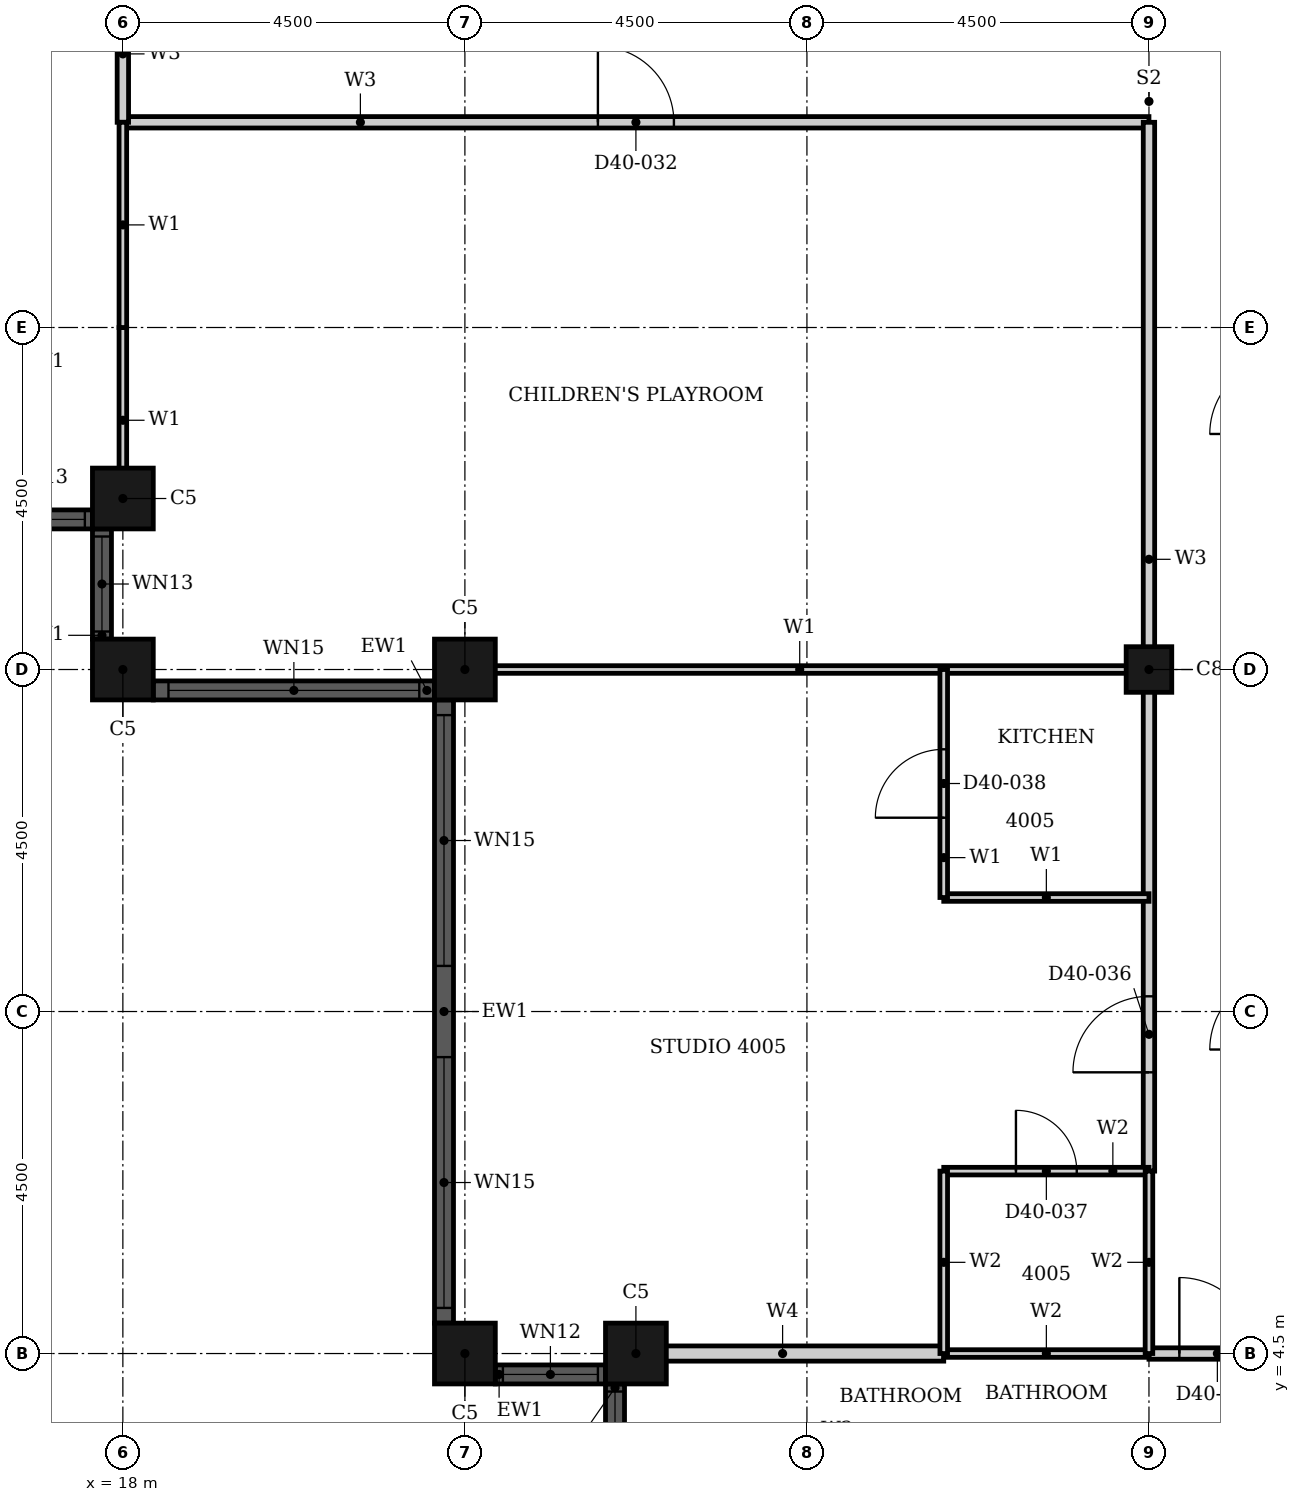
"""IFC4 building model, lengths in metres.
Left out: names, types, materials, properties, quantities, classifications, styles, units other than length and angle.
Written with IfcOpenShell. Run it as: python <this file> out.ifc"""

import sys

from ifc_helpers import new_model, si_unit, direction, frame, frame_2d, origin, origin_2d, place, context, subcontext, project, spatial, rectangle, hollow_rectangle, extrude, element, fill, save


model = new_model("IFC4")
c1 = context("Model", 3, precision=1e-05, world=origin(), true_north=direction((0.0, 1.0)))
c2 = subcontext(c1, "Body", "Model", "MODEL_VIEW")
j1 = project(units=[si_unit("LENGTHUNIT", "METRE"), si_unit("PLANEANGLEUNIT", "RADIAN")], contexts=[c1])
p1 = place(None, origin())
s1 = spatial("IfcSite", under=j1, at=p1, CompositionType="ELEMENT")
p2 = place(p1, origin())
s2 = spatial("IfcBuilding", under=s1, at=p2, CompositionType="ELEMENT")
p3 = place(p2, frame((0.0, 0.0, 161.7)))
s3 = spatial("IfcBuildingStorey", under=s2, at=p3, CompositionType="ELEMENT", Elevation=161.7)
for number, where, z_axis, x_axis in (
    (1, (22.5, 4.5, 0.0), (0.0, 0.0, 1.0), (1.0, 0.0, 0.0)),
    (2, (24.75, 4.5, 0.0), (0.0, 0.0, 1.0), (1.0, 0.0, 0.0)),
    (3, (18.0, 15.75, 0.0), (0.0, 0.0, 1.0), (1.0, 0.0, 0.0)),
    (4, (18.0, 13.5, 0.0), (0.0, 0.0, 1.0), (1.0, 0.0, 0.0)),
    (5, (22.5, 13.5, 0.0), (0.0, 0.0, 1.0), (1.0, 0.0, 0.0)),
):
    element("IfcColumn", number, at=place(p3, frame(where, z_axis=z_axis, x_axis=x_axis)), inside=s3, PredefinedType="COLUMN", context=c2, shape_type="SweptSolid", body=[
        extrude(hollow_rectangle(XDim=0.8, YDim=0.8, WallThickness=0.025, at=origin_2d()), origin(), (0.0, 0.0, 1.0), 3.7),
    ])
p4 = place(p3, frame((31.5, 13.5, 0.0), z_axis=(0.0, 0.0, 1.0), x_axis=(1.0, 0.0, 0.0)))
e6 = element("IfcColumn", 6, at=p4, inside=s3, PredefinedType="COLUMN", context=c2, shape_type="SweptSolid", body=[
    extrude(hollow_rectangle(XDim=0.6, YDim=0.6, WallThickness=0.02, at=origin_2d()), origin(), (0.0, 0.0, 1.0), 3.7),
])
p5 = place(p3, frame((22.9, 4.225, 0.0), z_axis=(0.0, 0.0, 1.0), x_axis=(1.0, 0.0, 0.0)))
e7 = element("IfcWall", 7, at=p5, inside=s3, PredefinedType="SOLIDWALL", context=c2, shape_type="SweptSolid", body=[
    extrude(rectangle(XDim=1.45, YDim=0.25, at=frame_2d((0.725, 0.0))), origin(), (0.0, 0.0, 1.0), 3.7),
])
p6 = place(p5, frame((0.1, 0.0, 0.9)))
e8 = element("IfcOpeningElement", 8, at=p6, cuts=e7, PredefinedType="OPENING", context=c2, shape_type="SweptSolid", body=[
    extrude(rectangle(XDim=1.25, YDim=2.08, at=frame_2d((0.625, 1.04))), frame((0.0, 0.135, 0.0), z_axis=(0.0, -1.0, 0.0), x_axis=(1.0, 0.0, 0.0)), (0.0, 0.0, 1.0), 0.27),
])
p7 = place(p3, frame((24.475, 4.1, 0.0), z_axis=(0.0, 0.0, 1.0), x_axis=(0.0, -1.0, 0.0)))
e9 = element("IfcWall", 9, at=p7, inside=s3, PredefinedType="SOLIDWALL", context=c2, shape_type="SweptSolid", body=[
    extrude(rectangle(XDim=1.45, YDim=0.25, at=frame_2d((0.725, 0.0))), origin(), (0.0, 0.0, 1.0), 3.7),
])
p8 = place(p7, frame((0.1, 0.0, 0.9)))
e10 = element("IfcOpeningElement", 10, at=p8, cuts=e9, PredefinedType="OPENING", context=c2, shape_type="SweptSolid", body=[
    extrude(rectangle(XDim=1.25, YDim=1.85, at=frame_2d((0.625, 0.925))), frame((0.0, 0.135, 0.0), z_axis=(0.0, -1.0, 0.0), x_axis=(1.0, 0.0, 0.0)), (0.0, 0.0, 1.0), 0.27),
])
p9 = place(p3, frame((16.15, 15.475, 0.0), z_axis=(0.0, 0.0, 1.0), x_axis=(1.0, 0.0, 0.0)))
e11 = element("IfcWall", 11, at=p9, inside=s3, PredefinedType="SOLIDWALL", context=c2, shape_type="SweptSolid", body=[
    extrude(rectangle(XDim=1.45, YDim=0.25, at=frame_2d((0.725, 0.0))), origin(), (0.0, 0.0, 1.0), 3.7),
])
p10 = place(p9, frame((0.1, 0.0, 0.9)))
e12 = element("IfcOpeningElement", 12, at=p10, cuts=e11, PredefinedType="OPENING", context=c2, shape_type="SweptSolid", body=[
    extrude(rectangle(XDim=1.25, YDim=1.85, at=frame_2d((0.625, 0.925))), frame((0.0, 0.135, 0.0), z_axis=(0.0, -1.0, 0.0), x_axis=(1.0, 0.0, 0.0)), (0.0, 0.0, 1.0), 0.27),
])
p11 = place(p3, frame((17.725, 15.35, 0.0), z_axis=(0.0, 0.0, 1.0), x_axis=(0.0, -1.0, 0.0)))
e13 = element("IfcWall", 13, at=p11, inside=s3, PredefinedType="SOLIDWALL", context=c2, shape_type="SweptSolid", body=[
    extrude(rectangle(XDim=1.45, YDim=0.25, at=frame_2d((0.725, 0.0))), origin(), (0.0, 0.0, 1.0), 3.7),
])
p12 = place(p11, frame((0.1, 0.0, 0.9)))
e14 = element("IfcOpeningElement", 14, at=p12, cuts=e13, PredefinedType="OPENING", context=c2, shape_type="SweptSolid", body=[
    extrude(rectangle(XDim=1.25, YDim=1.85, at=frame_2d((0.625, 0.925))), frame((0.0, 0.135, 0.0), z_axis=(0.0, -1.0, 0.0), x_axis=(1.0, 0.0, 0.0)), (0.0, 0.0, 1.0), 0.27),
])
p13 = place(p3, frame((18.4, 13.225, 0.0), z_axis=(0.0, 0.0, 1.0), x_axis=(1.0, 0.0, 0.0)))
e15 = element("IfcWall", 15, at=p13, inside=s3, PredefinedType="SOLIDWALL", context=c2, shape_type="SweptSolid", body=[
    extrude(rectangle(XDim=3.7, YDim=0.25, at=frame_2d((1.85, 0.0))), origin(), (0.0, 0.0, 1.0), 3.7),
])
p14 = place(p13, frame((0.2, 0.0, 0.45)))
e16 = element("IfcOpeningElement", 16, at=p14, cuts=e15, PredefinedType="OPENING", context=c2, shape_type="SweptSolid", body=[
    extrude(rectangle(XDim=3.3, YDim=2.3, at=frame_2d((1.65, 1.15))), frame((0.0, 0.135, 0.0), z_axis=(0.0, -1.0, 0.0), x_axis=(1.0, 0.0, 0.0)), (0.0, 0.0, 1.0), 0.27),
])
p15 = place(p3, frame((22.225, 13.1, 0.0), z_axis=(0.0, 0.0, 1.0), x_axis=(0.0, -1.0, 0.0)))
e17 = element("IfcWall", 17, at=p15, inside=s3, PredefinedType="SOLIDWALL", context=c2, shape_type="SweptSolid", body=[
    extrude(rectangle(XDim=8.2, YDim=0.25, at=frame_2d((4.1, 0.0))), origin(), (0.0, 0.0, 1.0), 3.7),
])
p16 = place(p15, frame((0.2, 0.0, 0.45)))
e18 = element("IfcOpeningElement", 18, at=p16, cuts=e17, PredefinedType="OPENING", context=c2, shape_type="SweptSolid", body=[
    extrude(rectangle(XDim=3.3, YDim=2.3, at=frame_2d((1.65, 1.15))), frame((0.0, 0.135, 0.0), z_axis=(0.0, -1.0, 0.0), x_axis=(1.0, 0.0, 0.0)), (0.0, 0.0, 1.0), 0.27),
])
p17 = place(p15, frame((4.7, 0.0, 0.45)))
e19 = element("IfcOpeningElement", 19, at=p17, cuts=e17, PredefinedType="OPENING", context=c2, shape_type="SweptSolid", body=[
    extrude(rectangle(XDim=3.3, YDim=2.3, at=frame_2d((1.65, 1.15))), frame((0.0, 0.135, 0.0), z_axis=(0.0, -1.0, 0.0), x_axis=(1.0, 0.0, 0.0)), (0.0, 0.0, 1.0), 0.27),
])
p18 = place(p3, frame((18.0, 20.7, 0.0), z_axis=(0.0, 0.0, 1.0), x_axis=(1.0, 0.0, 0.0)))
e20 = element("IfcWall", 20, at=p18, inside=s3, PredefinedType="PARTITIONING", context=c2, shape_type="SweptSolid", body=[
    extrude(rectangle(XDim=13.5, YDim=0.15, at=frame_2d((6.75, 0.0))), origin(), (0.0, 0.0, 1.0), 3.4),
])
p19 = place(p18, frame((6.25, 0.0, 0.0)))
e21 = element("IfcOpeningElement", 21, at=p19, cuts=e20, PredefinedType="OPENING", context=c2, shape_type="SweptSolid", body=[
    extrude(rectangle(XDim=1.0, YDim=2.1, at=frame_2d((0.5, 1.05))), frame((0.0, 0.085, 0.0), z_axis=(0.0, -1.0, 0.0), x_axis=(1.0, 0.0, 0.0)), (0.0, 0.0, 1.0), 0.17),
])
p20 = place(p3, frame((31.5, 4.5, 0.0), z_axis=(0.0, 0.0, 1.0), x_axis=(1.0, 0.0, 0.0)))
e22 = element("IfcWall", 22, at=p20, inside=s3, PredefinedType="PARTITIONING", context=c2, shape_type="SweptSolid", body=[
    extrude(rectangle(XDim=1.8, YDim=0.15, at=frame_2d((0.9, 0.0))), origin(), (0.0, 0.0, 1.0), 3.4),
])
p21 = place(p20, frame((0.4, 0.0, 0.0)))
e23 = element("IfcOpeningElement", 23, at=p21, cuts=e22, PredefinedType="OPENING", context=c2, shape_type="SweptSolid", body=[
    extrude(rectangle(XDim=1.0, YDim=2.2, at=frame_2d((0.5, 1.1))), frame((0.0, 0.085, 0.0), z_axis=(0.0, -1.0, 0.0), x_axis=(1.0, 0.0, 0.0)), (0.0, 0.0, 1.0), 0.17),
])
p22 = place(p3, frame((18.0, 20.7, 0.0), z_axis=(0.0, 0.0, 1.0), x_axis=(0.0, 1.0, 0.0)))
e24 = element("IfcWall", 24, at=p22, inside=s3, PredefinedType="PARTITIONING", context=c2, shape_type="SweptSolid", body=[
    extrude(rectangle(XDim=1.8, YDim=0.15, at=frame_2d((0.9, 0.0))), origin(), (0.0, 0.0, 1.0), 3.4),
])
p23 = place(p3, frame((31.5, 6.9, 0.0), z_axis=(0.0, 0.0, 1.0), x_axis=(0.0, 1.0, 0.0)))
e25 = element("IfcWall", 25, at=p23, inside=s3, PredefinedType="PARTITIONING", context=c2, shape_type="SweptSolid", body=[
    extrude(rectangle(XDim=13.8, YDim=0.15, at=frame_2d((6.9, 0.0))), origin(), (0.0, 0.0, 1.0), 2.68),
])
p24 = place(p23, frame((1.3, 0.0, 0.0)))
e26 = element("IfcOpeningElement", 26, at=p24, cuts=e25, PredefinedType="OPENING", context=c2, shape_type="SweptSolid", body=[
    extrude(rectangle(XDim=1.0, YDim=2.2, at=frame_2d((0.5, 1.1))), frame((0.0, 0.085, 0.0), z_axis=(0.0, -1.0, 0.0), x_axis=(1.0, 0.0, 0.0)), (0.0, 0.0, 1.0), 0.17),
])
p25 = place(p3, frame((28.8, 10.5, 0.0), z_axis=(0.0, 0.0, 1.0), x_axis=(1.0, 0.0, 0.0)))
e27 = element("IfcWall", 27, at=p25, inside=s3, PredefinedType="PARTITIONING", context=c2, shape_type="SweptSolid", body=[
    extrude(rectangle(XDim=2.7, YDim=0.1, at=frame_2d((1.35, 0.0))), origin(), (0.0, 0.0, 1.0), 3.4),
])
p26 = place(p3, frame((22.31, 13.5, 0.0), z_axis=(0.0, 0.0, 1.0), x_axis=(1.0, 0.0, 0.0)))
e28 = element("IfcWall", 28, at=p26, inside=s3, PredefinedType="PARTITIONING", context=c2, shape_type="SweptSolid", body=[
    extrude(rectangle(XDim=9.19, YDim=0.1, at=frame_2d((4.595, 0.0))), origin(), (0.0, 0.0, 1.0), 2.48),
])
p27 = place(p3, frame((18.0, 15.56, 0.0), z_axis=(0.0, 0.0, 1.0), x_axis=(0.0, 1.0, 0.0)))
e29 = element("IfcWall", 29, at=p27, inside=s3, PredefinedType="PARTITIONING", context=c2, shape_type="SweptSolid", body=[
    extrude(rectangle(XDim=2.439, YDim=0.1, at=frame_2d((1.219, 0.0))), origin(), (0.0, 0.0, 1.0), 3.4),
])
p28 = place(p3, frame((18.0, 18.0, 0.0), z_axis=(0.0, 0.0, 1.0), x_axis=(0.0, 1.0, 0.0)))
e30 = element("IfcWall", 30, at=p28, inside=s3, PredefinedType="PARTITIONING", context=c2, shape_type="SweptSolid", body=[
    extrude(rectangle(XDim=2.7, YDim=0.1, at=frame_2d((1.35, 0.0))), origin(), (0.0, 0.0, 1.0), 3.4),
])
p29 = place(p3, frame((28.8, 10.5, 0.0), z_axis=(0.0, 0.0, 1.0), x_axis=(0.0, 1.0, 0.0)))
e31 = element("IfcWall", 31, at=p29, inside=s3, PredefinedType="PARTITIONING", context=c2, shape_type="SweptSolid", body=[
    extrude(rectangle(XDim=3.0, YDim=0.1, at=frame_2d((1.5, 0.0))), origin(), (0.0, 0.0, 1.0), 3.4),
])
p30 = place(p29, frame((1.05, 0.0, 0.0)))
e32 = element("IfcOpeningElement", 32, at=p30, cuts=e31, PredefinedType="OPENING", context=c2, shape_type="SweptSolid", body=[
    extrude(rectangle(XDim=0.9, YDim=2.1, at=frame_2d((0.45, 1.05))), frame((0.0, 0.06, 0.0), z_axis=(0.0, -1.0, 0.0), x_axis=(1.0, 0.0, 0.0)), (0.0, 0.0, 1.0), 0.12),
])
p31 = place(p3, frame((24.56, 4.5, 0.0), z_axis=(0.0, 0.0, 1.0), x_axis=(1.0, 0.0, 0.0)))
e33 = element("IfcWall", 33, at=p31, inside=s3, PredefinedType="PARTITIONING", context=c2, shape_type="SweptSolid", body=[
    extrude(rectangle(XDim=4.24, YDim=0.2, at=frame_2d((2.12, 0.0))), origin(), (0.0, 0.0, 1.0), 3.4),
])
p32 = place(p3, frame((28.8, 4.5, 0.0), z_axis=(0.0, 0.0, 1.0), x_axis=(1.0, 0.0, 0.0)))
e34 = element("IfcWall", 34, at=p32, inside=s3, PredefinedType="PARTITIONING", context=c2, shape_type="SweptSolid", body=[
    extrude(rectangle(XDim=2.7, YDim=0.1, at=frame_2d((1.35, 0.0))), origin(), (0.0, 0.0, 1.0), 3.4),
])
p33 = place(p3, frame((28.8, 6.9, 0.0), z_axis=(0.0, 0.0, 1.0), x_axis=(1.0, 0.0, 0.0)))
e35 = element("IfcWall", 35, at=p33, inside=s3, PredefinedType="PARTITIONING", context=c2, shape_type="SweptSolid", body=[
    extrude(rectangle(XDim=2.7, YDim=0.1, at=frame_2d((1.35, 0.0))), origin(), (0.0, 0.0, 1.0), 3.4),
])
p34 = place(p33, frame((0.95, 0.0, 0.0)))
e36 = element("IfcOpeningElement", 36, at=p34, cuts=e35, PredefinedType="OPENING", context=c2, shape_type="SweptSolid", body=[
    extrude(rectangle(XDim=0.8, YDim=2.1, at=frame_2d((0.4, 1.05))), frame((0.0, 0.06, 0.0), z_axis=(0.0, -1.0, 0.0), x_axis=(1.0, 0.0, 0.0)), (0.0, 0.0, 1.0), 0.12),
])
p35 = place(p3, frame((28.8, 4.5, 0.0), z_axis=(0.0, 0.0, 1.0), x_axis=(0.0, 1.0, 0.0)))
e37 = element("IfcWall", 37, at=p35, inside=s3, PredefinedType="PARTITIONING", context=c2, shape_type="SweptSolid", body=[
    extrude(rectangle(XDim=2.4, YDim=0.1, at=frame_2d((1.2, 0.0))), origin(), (0.0, 0.0, 1.0), 3.4),
])
p36 = place(p3, frame((31.5, 4.5, 0.0), z_axis=(0.0, 0.0, 1.0), x_axis=(0.0, 1.0, 0.0)))
e38 = element("IfcWall", 38, at=p36, inside=s3, PredefinedType="PARTITIONING", context=c2, shape_type="SweptSolid", body=[
    extrude(rectangle(XDim=2.4, YDim=0.1, at=frame_2d((1.2, 0.0))), origin(), (0.0, 0.0, 1.0), 2.68),
])
p37 = place(p6, origin())
e39 = element("IfcWindow", 39, at=p37, inside=s3, PartitioningType="SINGLE_PANEL", PredefinedType="WINDOW", context=c2, shape_type="SweptSolid", body=[
    extrude(rectangle(XDim=1.25, YDim=2.08, at=frame_2d((0.625, 1.04))), frame((0.0, 0.03, 0.0), z_axis=(0.0, -1.0, 0.0), x_axis=(1.0, 0.0, 0.0)), (0.0, 0.0, 1.0), 0.06),
])
fill(e8, e39)
p38 = place(p8, origin())
e40 = element("IfcWindow", 40, at=p38, inside=s3, PartitioningType="SINGLE_PANEL", PredefinedType="WINDOW", context=c2, shape_type="SweptSolid", body=[
    extrude(rectangle(XDim=1.25, YDim=1.85, at=frame_2d((0.625, 0.925))), frame((0.0, 0.03, 0.0), z_axis=(0.0, -1.0, 0.0), x_axis=(1.0, 0.0, 0.0)), (0.0, 0.0, 1.0), 0.06),
])
fill(e10, e40)
p39 = place(p10, origin())
e41 = element("IfcWindow", 41, at=p39, inside=s3, PartitioningType="SINGLE_PANEL", PredefinedType="WINDOW", context=c2, shape_type="SweptSolid", body=[
    extrude(rectangle(XDim=1.25, YDim=1.85, at=frame_2d((0.625, 0.925))), frame((0.0, 0.03, 0.0), z_axis=(0.0, -1.0, 0.0), x_axis=(1.0, 0.0, 0.0)), (0.0, 0.0, 1.0), 0.06),
])
fill(e12, e41)
p40 = place(p12, origin())
e42 = element("IfcWindow", 42, at=p40, inside=s3, PartitioningType="SINGLE_PANEL", PredefinedType="WINDOW", context=c2, shape_type="SweptSolid", body=[
    extrude(rectangle(XDim=1.25, YDim=1.85, at=frame_2d((0.625, 0.925))), frame((0.0, 0.03, 0.0), z_axis=(0.0, -1.0, 0.0), x_axis=(1.0, 0.0, 0.0)), (0.0, 0.0, 1.0), 0.06),
])
fill(e14, e42)
p41 = place(p14, origin())
e43 = element("IfcWindow", 43, at=p41, inside=s3, PartitioningType="SINGLE_PANEL", PredefinedType="WINDOW", context=c2, shape_type="SweptSolid", body=[
    extrude(rectangle(XDim=3.3, YDim=2.3, at=frame_2d((1.65, 1.15))), frame((0.0, 0.03, 0.0), z_axis=(0.0, -1.0, 0.0), x_axis=(1.0, 0.0, 0.0)), (0.0, 0.0, 1.0), 0.06),
])
fill(e16, e43)
p42 = place(p16, origin())
e44 = element("IfcWindow", 44, at=p42, inside=s3, PartitioningType="SINGLE_PANEL", PredefinedType="WINDOW", context=c2, shape_type="SweptSolid", body=[
    extrude(rectangle(XDim=3.3, YDim=2.3, at=frame_2d((1.65, 1.15))), frame((0.0, 0.03, 0.0), z_axis=(0.0, -1.0, 0.0), x_axis=(1.0, 0.0, 0.0)), (0.0, 0.0, 1.0), 0.06),
])
fill(e18, e44)
p43 = place(p17, origin())
e45 = element("IfcWindow", 45, at=p43, inside=s3, PartitioningType="SINGLE_PANEL", PredefinedType="WINDOW", context=c2, shape_type="SweptSolid", body=[
    extrude(rectangle(XDim=3.3, YDim=2.3, at=frame_2d((1.65, 1.15))), frame((0.0, 0.03, 0.0), z_axis=(0.0, -1.0, 0.0), x_axis=(1.0, 0.0, 0.0)), (0.0, 0.0, 1.0), 0.06),
])
fill(e19, e45)
p44 = place(p19, origin())
e46 = element("IfcDoor", 46, at=p44, inside=s3, OperationType="SINGLE_SWING_RIGHT", PredefinedType="DOOR", context=c2, shape_type="SweptSolid", body=[
    extrude(rectangle(XDim=1.0, YDim=2.1, at=frame_2d((0.5, 1.05))), frame((0.0, 0.025, 0.0), z_axis=(0.0, -1.0, 0.0), x_axis=(1.0, 0.0, 0.0)), (0.0, 0.0, 1.0), 0.05),
])
fill(e21, e46)
p45 = place(p24, origin())
e47 = element("IfcDoor", 47, at=p45, inside=s3, OperationType="SINGLE_SWING_LEFT", PredefinedType="DOOR", context=c2, shape_type="SweptSolid", body=[
    extrude(rectangle(XDim=1.0, YDim=2.2, at=frame_2d((0.5, 1.1))), frame((0.0, 0.025, 0.0), z_axis=(0.0, -1.0, 0.0), x_axis=(1.0, 0.0, 0.0)), (0.0, 0.0, 1.0), 0.05),
])
fill(e26, e47)
p46 = place(p34, origin())
e48 = element("IfcDoor", 48, at=p46, inside=s3, OperationType="SINGLE_SWING_LEFT", PredefinedType="DOOR", context=c2, shape_type="SweptSolid", body=[
    extrude(rectangle(XDim=0.8, YDim=2.1, at=frame_2d((0.4, 1.05))), frame((0.0, 0.025, 0.0), z_axis=(0.0, -1.0, 0.0), x_axis=(1.0, 0.0, 0.0)), (0.0, 0.0, 1.0), 0.05),
])
fill(e36, e48)
p47 = place(p30, origin())
e49 = element("IfcDoor", 49, at=p47, inside=s3, OperationType="SINGLE_SWING_LEFT", PredefinedType="DOOR", context=c2, shape_type="SweptSolid", body=[
    extrude(rectangle(XDim=0.9, YDim=2.1, at=frame_2d((0.45, 1.05))), frame((0.0, 0.025, 0.0), z_axis=(0.0, -1.0, 0.0), x_axis=(1.0, 0.0, 0.0)), (0.0, 0.0, 1.0), 0.05),
])
fill(e32, e49)
p48 = place(p21, origin())
e50 = element("IfcDoor", 50, at=p48, inside=s3, OperationType="SINGLE_SWING_RIGHT", PredefinedType="DOOR", context=c2, shape_type="SweptSolid", body=[
    extrude(rectangle(XDim=1.0, YDim=2.2, at=frame_2d((0.5, 1.1))), frame((0.0, 0.025, 0.0), z_axis=(0.0, -1.0, 0.0), x_axis=(1.0, 0.0, 0.0)), (0.0, 0.0, 1.0), 0.05),
])
fill(e23, e50)
save(model, sys.argv[1])
